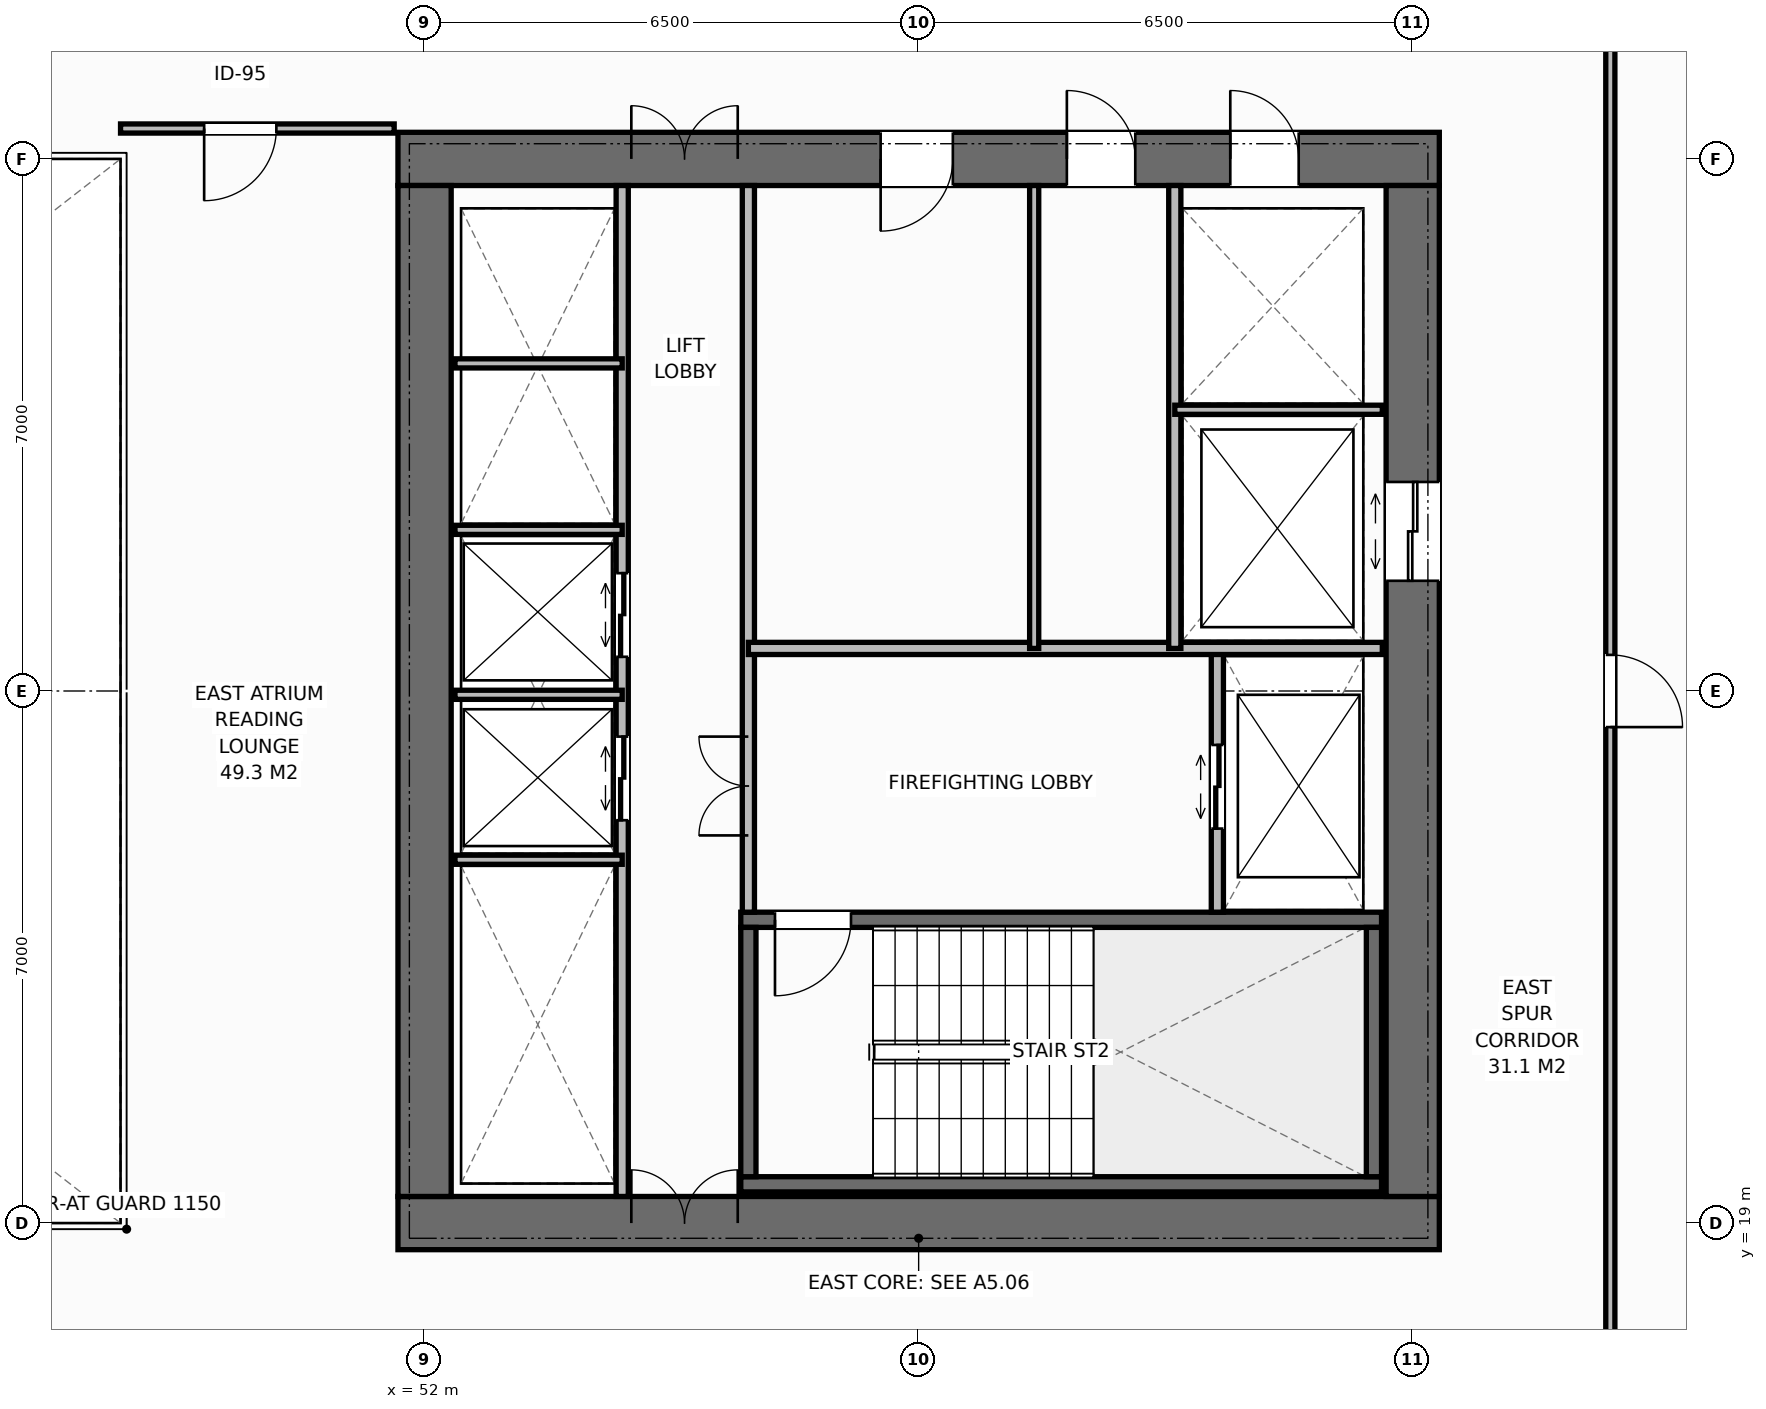
"""IFC4 building model, lengths in metres.
Left out: names, types, materials, properties, quantities, classifications, styles, units other than length and angle.
Written with IfcOpenShell. Run it as: python <this file> out.ifc"""

import sys

from ifc_helpers import new_model, si_unit, direction, frame, frame_2d, origin, place, context, subcontext, project, spatial, rectangle, extrude, element, fill, save


model = new_model("IFC4")
c1 = context("Model", 3, precision=1e-05, world=origin(), true_north=direction((0.0, 1.0)))
c2 = subcontext(c1, "Body", "Model", "MODEL_VIEW")
j1 = project(units=[si_unit("LENGTHUNIT", "METRE"), si_unit("PLANEANGLEUNIT", "RADIAN")], contexts=[c1])
p1 = place(None, origin())
s1 = spatial("IfcSite", under=j1, at=p1, CompositionType="ELEMENT")
p2 = place(p1, origin())
s2 = spatial("IfcBuilding", under=s1, at=p2, CompositionType="ELEMENT")
p3 = place(p2, frame((0.0, 0.0, 89.8)))
s3 = spatial("IfcBuildingStorey", under=s2, at=p3, CompositionType="ELEMENT", Elevation=89.8)
p4 = place(p3, frame((51.65, 19.0, 0.0), z_axis=(0.0, 0.0, 1.0), x_axis=(1.0, 0.0, 0.0)))
e1 = element("IfcWall", 1, at=p4, inside=s3, PredefinedType="SHEAR", context=c2, shape_type="SweptSolid", body=[
    extrude(rectangle(XDim=13.7, YDim=0.7, at=frame_2d((6.85, 0.0))), origin(), (0.0, 0.0, 1.0), 3.8),
])
p5 = place(p4, frame((3.07, 0.0, 0.0)))
e2 = element("IfcOpeningElement", 2, at=p5, cuts=e1, PredefinedType="OPENING", context=c2, shape_type="SweptSolid", body=[
    extrude(rectangle(XDim=1.4, YDim=2.2, at=frame_2d((0.7, 1.1))), frame((0.0, 0.36, 0.0), z_axis=(0.0, -1.0, 0.0), x_axis=(1.0, 0.0, 0.0)), (0.0, 0.0, 1.0), 0.72),
])
p6 = place(p3, frame((51.65, 33.0, 0.0), z_axis=(0.0, 0.0, 1.0), x_axis=(1.0, 0.0, 0.0)))
e3 = element("IfcWall", 3, at=p6, inside=s3, PredefinedType="SHEAR", context=c2, shape_type="SweptSolid", body=[
    extrude(rectangle(XDim=13.7, YDim=0.7, at=frame_2d((6.85, 0.0))), origin(), (0.0, 0.0, 1.0), 3.8),
])
p7 = place(p6, frame((3.07, 0.0, 0.0)))
e4 = element("IfcOpeningElement", 4, at=p7, cuts=e3, PredefinedType="OPENING", context=c2, shape_type="SweptSolid", body=[
    extrude(rectangle(XDim=1.4, YDim=2.2, at=frame_2d((0.7, 1.1))), frame((0.0, 0.36, 0.0), z_axis=(0.0, -1.0, 0.0), x_axis=(1.0, 0.0, 0.0)), (0.0, 0.0, 1.0), 0.72),
])
p8 = place(p6, frame((10.95, 0.0, 0.0)))
e5 = element("IfcOpeningElement", 5, at=p8, cuts=e3, PredefinedType="OPENING", context=c2, shape_type="SweptSolid", body=[
    extrude(rectangle(XDim=0.9, YDim=2.15, at=frame_2d((0.45, 1.075))), frame((0.0, 0.36, 0.0), z_axis=(0.0, -1.0, 0.0), x_axis=(1.0, 0.0, 0.0)), (0.0, 0.0, 1.0), 0.72),
])
p9 = place(p6, frame((6.35, 0.0, 0.0)))
e6 = element("IfcOpeningElement", 6, at=p9, cuts=e3, PredefinedType="OPENING", context=c2, shape_type="SweptSolid", body=[
    extrude(rectangle(XDim=0.95, YDim=2.15, at=frame_2d((0.475, 1.075))), frame((0.0, 0.36, 0.0), z_axis=(0.0, -1.0, 0.0), x_axis=(1.0, 0.0, 0.0)), (0.0, 0.0, 1.0), 0.72),
])
p10 = place(p6, frame((8.8, 0.0, 0.0)))
e7 = element("IfcOpeningElement", 7, at=p10, cuts=e3, PredefinedType="OPENING", context=c2, shape_type="SweptSolid", body=[
    extrude(rectangle(XDim=0.9, YDim=2.15, at=frame_2d((0.45, 1.075))), frame((0.0, 0.36, 0.0), z_axis=(0.0, -1.0, 0.0), x_axis=(1.0, 0.0, 0.0)), (0.0, 0.0, 1.0), 0.72),
])
p11 = place(p3, frame((52.0, 19.35, 0.0), z_axis=(0.0, 0.0, 1.0), x_axis=(0.0, 1.0, 0.0)))
e8 = element("IfcWall", 8, at=p11, inside=s3, PredefinedType="SHEAR", context=c2, shape_type="SweptSolid", body=[
    extrude(rectangle(XDim=13.3, YDim=0.7, at=frame_2d((6.65, 0.0))), origin(), (0.0, 0.0, 1.0), 3.8),
])
p12 = place(p3, frame((65.0, 19.35, 0.0), z_axis=(0.0, 0.0, 1.0), x_axis=(0.0, 1.0, 0.0)))
e9 = element("IfcWall", 9, at=p12, inside=s3, PredefinedType="SHEAR", context=c2, shape_type="SweptSolid", body=[
    extrude(rectangle(XDim=13.3, YDim=0.7, at=frame_2d((6.65, 0.0))), origin(), (0.0, 0.0, 1.0), 3.8),
])
p13 = place(p12, frame((8.1, 0.0, 0.0)))
e10 = element("IfcOpeningElement", 10, at=p13, cuts=e9, PredefinedType="OPENING", context=c2, shape_type="SweptSolid", body=[
    extrude(rectangle(XDim=1.3, YDim=2.2, at=frame_2d((0.65, 1.1))), frame((0.0, 0.36, 0.0), z_axis=(0.0, -1.0, 0.0), x_axis=(1.0, 0.0, 0.0)), (0.0, 0.0, 1.0), 0.72),
])
p14 = place(p3, frame((56.16, 19.51, 0.0), z_axis=(0.0, 0.0, 1.0), x_axis=(1.0, 0.0, 0.0)))
e11 = element("IfcWall", 11, at=p14, inside=s3, PredefinedType="SHEAR", context=c2, shape_type="SweptSolid", body=[
    extrude(rectangle(XDim=8.43, YDim=0.2, at=frame_2d((4.215, 0.0))), origin(), (0.0, 0.0, 1.0), 3.8),
])
p15 = place(p3, frame((56.16, 22.99, 0.0), z_axis=(0.0, 0.0, 1.0), x_axis=(1.0, 0.0, 0.0)))
e12 = element("IfcWall", 12, at=p15, inside=s3, PredefinedType="SHEAR", context=c2, shape_type="SweptSolid", body=[
    extrude(rectangle(XDim=8.43, YDim=0.2, at=frame_2d((4.215, 0.0))), origin(), (0.0, 0.0, 1.0), 3.8),
])
p16 = place(p15, frame((0.45, 0.0, 0.0)))
e13 = element("IfcOpeningElement", 13, at=p16, cuts=e12, PredefinedType="OPENING", context=c2, shape_type="SweptSolid", body=[
    extrude(rectangle(XDim=1.0, YDim=2.15, at=frame_2d((0.5, 1.075))), frame((0.0, 0.11, 0.0), z_axis=(0.0, -1.0, 0.0), x_axis=(1.0, 0.0, 0.0)), (0.0, 0.0, 1.0), 0.22),
])
for number, where, z_axis, x_axis in (
    (14, (56.26, 19.61, 0.0), (0.0, 0.0, 1.0), (0.0, 1.0, 0.0)),
    (15, (64.49, 19.61, 0.0), (0.0, 0.0, 1.0), (0.0, 1.0, 0.0)),
):
    element("IfcWall", number, at=place(p3, frame(where, z_axis=z_axis, x_axis=x_axis)), inside=s3, PredefinedType="SHEAR", context=c2, shape_type="SweptSolid", body=[
        extrude(rectangle(XDim=3.28, YDim=0.2, at=frame_2d((1.64, 0.0))), origin(), (0.0, 0.0, 1.0), 3.8),
    ])
p17 = place(p3, frame((54.6, 19.35, 0.0), z_axis=(0.0, 0.0, 1.0), x_axis=(0.0, 1.0, 0.0)))
e16 = element("IfcWall", 16, at=p17, inside=s3, PredefinedType="STANDARD", context=c2, shape_type="SweptSolid", body=[
    extrude(rectangle(XDim=13.3, YDim=0.16, at=frame_2d((6.65, 0.0))), origin(), (0.0, 0.0, 1.0), 3.565),
])
p18 = place(p17, frame((4.95, 0.0, 0.0)))
e17 = element("IfcOpeningElement", 17, at=p18, cuts=e16, PredefinedType="OPENING", context=c2, shape_type="SweptSolid", body=[
    extrude(rectangle(XDim=1.1, YDim=2.2, at=frame_2d((0.55, 1.1))), frame((0.0, 0.09, 0.0), z_axis=(0.0, -1.0, 0.0), x_axis=(1.0, 0.0, 0.0)), (0.0, 0.0, 1.0), 0.18),
])
p19 = place(p17, frame((7.1, 0.0, 0.0)))
e18 = element("IfcOpeningElement", 18, at=p19, cuts=e16, PredefinedType="OPENING", context=c2, shape_type="SweptSolid", body=[
    extrude(rectangle(XDim=1.1, YDim=2.2, at=frame_2d((0.55, 1.1))), frame((0.0, 0.09, 0.0), z_axis=(0.0, -1.0, 0.0), x_axis=(1.0, 0.0, 0.0)), (0.0, 0.0, 1.0), 0.18),
])
p20 = place(p3, frame((56.26, 23.09, 0.0), z_axis=(0.0, 0.0, 1.0), x_axis=(0.0, 1.0, 0.0)))
e19 = element("IfcWall", 19, at=p20, inside=s3, PredefinedType="STANDARD", context=c2, shape_type="SweptSolid", body=[
    extrude(rectangle(XDim=9.56, YDim=0.16, at=frame_2d((4.78, 0.0))), origin(), (0.0, 0.0, 1.0), 3.565),
])
p21 = place(p20, frame((1.01, 0.0, 0.0)))
e20 = element("IfcOpeningElement", 20, at=p21, cuts=e19, PredefinedType="OPENING", context=c2, shape_type="SweptSolid", body=[
    extrude(rectangle(XDim=1.3, YDim=2.2, at=frame_2d((0.65, 1.1))), frame((0.0, 0.09, 0.0), z_axis=(0.0, -1.0, 0.0), x_axis=(1.0, 0.0, 0.0)), (0.0, 0.0, 1.0), 0.18),
])
for number, where, z_axis, x_axis in (
    (21, (52.4, 23.78, 0.0), (0.0, 0.0, 1.0), (1.0, 0.0, 0.0)),
    (22, (52.4, 25.95, 0.0), (0.0, 0.0, 1.0), (1.0, 0.0, 0.0)),
    (23, (52.4, 28.12, 0.0), (0.0, 0.0, 1.0), (1.0, 0.0, 0.0)),
    (24, (52.4, 30.31, 0.0), (0.0, 0.0, 1.0), (1.0, 0.0, 0.0)),
):
    element("IfcWall", number, at=place(p3, frame(where, z_axis=z_axis, x_axis=x_axis)), inside=s3, PredefinedType="PARTITIONING", context=c2, shape_type="SweptSolid", body=[
        extrude(rectangle(XDim=2.2, YDim=0.12, at=frame_2d((1.1, 0.0))), origin(), (0.0, 0.0, 1.0), 3.565),
    ])
p22 = place(p3, frame((62.43, 23.09, 0.0), z_axis=(0.0, 0.0, 1.0), x_axis=(0.0, 1.0, 0.0)))
e25 = element("IfcWall", 25, at=p22, inside=s3, PredefinedType="STANDARD", context=c2, shape_type="SweptSolid", body=[
    extrude(rectangle(XDim=3.47, YDim=0.16, at=frame_2d((1.735, 0.0))), origin(), (0.0, 0.0, 1.0), 3.565),
])
p23 = place(p22, frame((1.1, 0.0, 0.0)))
e26 = element("IfcOpeningElement", 26, at=p23, cuts=e25, PredefinedType="OPENING", context=c2, shape_type="SweptSolid", body=[
    extrude(rectangle(XDim=1.1, YDim=2.2, at=frame_2d((0.55, 1.1))), frame((0.0, 0.09, 0.0), z_axis=(0.0, -1.0, 0.0), x_axis=(1.0, 0.0, 0.0)), (0.0, 0.0, 1.0), 0.18),
])
p24 = place(p3, frame((56.26, 26.56, 0.0), z_axis=(0.0, 0.0, 1.0), x_axis=(1.0, 0.0, 0.0)))
e27 = element("IfcWall", 27, at=p24, inside=s3, PredefinedType="STANDARD", context=c2, shape_type="SweptSolid", body=[
    extrude(rectangle(XDim=8.34, YDim=0.16, at=frame_2d((4.17, 0.0))), origin(), (0.0, 0.0, 1.0), 3.565),
])
p25 = place(p3, frame((61.87, 26.56, 0.0), z_axis=(0.0, 0.0, 1.0), x_axis=(0.0, 1.0, 0.0)))
e28 = element("IfcWall", 28, at=p25, inside=s3, PredefinedType="STANDARD", context=c2, shape_type="SweptSolid", body=[
    extrude(rectangle(XDim=6.09, YDim=0.16, at=frame_2d((3.045, 0.0))), origin(), (0.0, 0.0, 1.0), 3.565),
])
p26 = place(p3, frame((61.87, 29.7, 0.0), z_axis=(0.0, 0.0, 1.0), x_axis=(1.0, 0.0, 0.0)))
e29 = element("IfcWall", 29, at=p26, inside=s3, PredefinedType="PARTITIONING", context=c2, shape_type="SweptSolid", body=[
    extrude(rectangle(XDim=2.73, YDim=0.12, at=frame_2d((1.365, 0.0))), origin(), (0.0, 0.0, 1.0), 3.565),
])
p27 = place(p3, frame((60.02, 26.56, 0.0), z_axis=(0.0, 0.0, 1.0), x_axis=(0.0, 1.0, 0.0)))
e30 = element("IfcWall", 30, at=p27, inside=s3, PredefinedType="PARTITIONING", context=c2, shape_type="SweptSolid", body=[
    extrude(rectangle(XDim=6.09, YDim=0.12, at=frame_2d((3.045, 0.0))), origin(), (0.0, 0.0, 1.0), 3.565),
])
p28 = place(p3, frame((48.0, 33.4, 0.0), z_axis=(0.0, 0.0, 1.0), x_axis=(1.0, 0.0, 0.0)))
e31 = element("IfcWall", 31, at=p28, inside=s3, PredefinedType="PARTITIONING", context=c2, shape_type="SweptSolid", body=[
    extrude(rectangle(XDim=3.6, YDim=0.12, at=frame_2d((1.8, 0.0))), origin(), (0.0, 0.0, 1.0), 3.565),
])
p29 = place(p28, frame((1.1, 0.0, 0.0)))
e32 = element("IfcOpeningElement", 32, at=p29, cuts=e31, PredefinedType="OPENING", context=c2, shape_type="SweptSolid", body=[
    extrude(rectangle(XDim=0.95, YDim=2.15, at=frame_2d((0.475, 1.075))), frame((0.0, 0.07, 0.0), z_axis=(0.0, -1.0, 0.0), x_axis=(1.0, 0.0, 0.0)), (0.0, 0.0, 1.0), 0.14),
])
p30 = place(p3, frame((67.6, 16.5, 0.0), z_axis=(0.0, 0.0, 1.0), x_axis=(0.0, 1.0, 0.0)))
e33 = element("IfcWall", 33, at=p30, inside=s3, PredefinedType="PARTITIONING", context=c2, shape_type="SweptSolid", body=[
    extrude(rectangle(XDim=19.0, YDim=0.12, at=frame_2d((9.5, 0.0))), origin(), (0.0, 0.0, 1.0), 3.565),
])
p31 = place(p30, frame((9.025, 0.0, 0.0)))
e34 = element("IfcOpeningElement", 34, at=p31, cuts=e33, PredefinedType="OPENING", context=c2, shape_type="SweptSolid", body=[
    extrude(rectangle(XDim=0.95, YDim=2.15, at=frame_2d((0.475, 1.075))), frame((0.0, 0.07, 0.0), z_axis=(0.0, -1.0, 0.0), x_axis=(1.0, 0.0, 0.0)), (0.0, 0.0, 1.0), 0.14),
])
p32 = place(p5, origin())
e35 = element("IfcDoor", 35, at=p32, inside=s3, OperationType="DOUBLE_DOOR_SINGLE_SWING", PredefinedType="DOOR", context=c2, shape_type="SweptSolid", body=[
    extrude(rectangle(XDim=1.4, YDim=2.2, at=frame_2d((0.7, 1.1))), frame((0.0, 0.125, 0.0), z_axis=(0.0, -1.0, 0.0), x_axis=(1.0, 0.0, 0.0)), (0.0, 0.0, 1.0), 0.05),
])
fill(e2, e35)
p33 = place(p7, origin())
e36 = element("IfcDoor", 36, at=p33, inside=s3, OperationType="DOUBLE_DOOR_SINGLE_SWING", PredefinedType="DOOR", context=c2, shape_type="SweptSolid", body=[
    extrude(rectangle(XDim=1.4, YDim=2.2, at=frame_2d((0.7, 1.1))), frame((0.0, -0.075, 0.0), z_axis=(0.0, -1.0, 0.0), x_axis=(1.0, 0.0, 0.0)), (0.0, 0.0, 1.0), 0.05),
])
fill(e4, e36)
p34 = place(p18, origin())
e37 = element("IfcDoor", 37, at=p34, inside=s3, OperationType="DOUBLE_DOOR_SLIDING", PredefinedType="DOOR", context=c2, shape_type="SweptSolid", body=[
    extrude(rectangle(XDim=1.1, YDim=2.2, at=frame_2d((0.55, 1.1))), frame((0.0, 0.025, 0.0), z_axis=(0.0, -1.0, 0.0), x_axis=(1.0, 0.0, 0.0)), (0.0, 0.0, 1.0), 0.05),
])
fill(e17, e37)
p35 = place(p19, origin())
e38 = element("IfcDoor", 38, at=p35, inside=s3, OperationType="DOUBLE_DOOR_SLIDING", PredefinedType="DOOR", context=c2, shape_type="SweptSolid", body=[
    extrude(rectangle(XDim=1.1, YDim=2.2, at=frame_2d((0.55, 1.1))), frame((0.0, 0.025, 0.0), z_axis=(0.0, -1.0, 0.0), x_axis=(1.0, 0.0, 0.0)), (0.0, 0.0, 1.0), 0.05),
])
fill(e18, e38)
p36 = place(p16, origin())
e39 = element("IfcDoor", 39, at=p36, inside=s3, OperationType="SINGLE_SWING_RIGHT", PredefinedType="DOOR", context=c2, shape_type="SweptSolid", body=[
    extrude(rectangle(XDim=1.0, YDim=2.15, at=frame_2d((0.5, 1.075))), frame((0.0, 0.025, 0.0), z_axis=(0.0, -1.0, 0.0), x_axis=(1.0, 0.0, 0.0)), (0.0, 0.0, 1.0), 0.05),
])
fill(e13, e39)
p37 = place(p23, origin())
e40 = element("IfcDoor", 40, at=p37, inside=s3, OperationType="DOUBLE_DOOR_SLIDING", PredefinedType="DOOR", context=c2, shape_type="SweptSolid", body=[
    extrude(rectangle(XDim=1.1, YDim=2.2, at=frame_2d((0.55, 1.1))), frame((0.0, 0.025, 0.0), z_axis=(0.0, -1.0, 0.0), x_axis=(1.0, 0.0, 0.0)), (0.0, 0.0, 1.0), 0.05),
])
fill(e26, e40)
p38 = place(p21, origin())
e41 = element("IfcDoor", 41, at=p38, inside=s3, OperationType="DOUBLE_DOOR_SINGLE_SWING", PredefinedType="DOOR", context=c2, shape_type="SweptSolid", body=[
    extrude(rectangle(XDim=1.3, YDim=2.2, at=frame_2d((0.65, 1.1))), frame((0.0, 0.025, 0.0), z_axis=(0.0, -1.0, 0.0), x_axis=(1.0, 0.0, 0.0)), (0.0, 0.0, 1.0), 0.05),
])
fill(e20, e41)
p39 = place(p13, origin())
e42 = element("IfcDoor", 42, at=p39, inside=s3, OperationType="DOUBLE_DOOR_SLIDING", PredefinedType="DOOR", context=c2, shape_type="SweptSolid", body=[
    extrude(rectangle(XDim=1.3, YDim=2.2, at=frame_2d((0.65, 1.1))), frame((0.0, 0.025, 0.0), z_axis=(0.0, -1.0, 0.0), x_axis=(1.0, 0.0, 0.0)), (0.0, 0.0, 1.0), 0.05),
])
fill(e10, e42)
p40 = place(p8, origin())
e43 = element("IfcDoor", 43, at=p40, inside=s3, OperationType="SINGLE_SWING_LEFT", PredefinedType="DOOR", context=c2, shape_type="SweptSolid", body=[
    extrude(rectangle(XDim=0.9, YDim=2.15, at=frame_2d((0.45, 1.075))), frame((0.0, -0.075, 0.0), z_axis=(0.0, -1.0, 0.0), x_axis=(1.0, 0.0, 0.0)), (0.0, 0.0, 1.0), 0.05),
])
fill(e5, e43)
p41 = place(p9, origin())
e44 = element("IfcDoor", 44, at=p41, inside=s3, OperationType="SINGLE_SWING_RIGHT", PredefinedType="DOOR", context=c2, shape_type="SweptSolid", body=[
    extrude(rectangle(XDim=0.95, YDim=2.15, at=frame_2d((0.475, 1.075))), frame((0.0, -0.075, 0.0), z_axis=(0.0, -1.0, 0.0), x_axis=(1.0, 0.0, 0.0)), (0.0, 0.0, 1.0), 0.05),
])
fill(e6, e44)
p42 = place(p10, origin())
e45 = element("IfcDoor", 45, at=p42, inside=s3, OperationType="SINGLE_SWING_LEFT", PredefinedType="DOOR", context=c2, shape_type="SweptSolid", body=[
    extrude(rectangle(XDim=0.9, YDim=2.15, at=frame_2d((0.45, 1.075))), frame((0.0, -0.075, 0.0), z_axis=(0.0, -1.0, 0.0), x_axis=(1.0, 0.0, 0.0)), (0.0, 0.0, 1.0), 0.05),
])
fill(e7, e45)
p43 = place(p29, origin())
e46 = element("IfcDoor", 46, at=p43, inside=s3, OperationType="SINGLE_SWING_RIGHT", PredefinedType="DOOR", context=c2, shape_type="SweptSolid", body=[
    extrude(rectangle(XDim=0.95, YDim=2.15, at=frame_2d((0.475, 1.075))), frame((0.0, 0.025, 0.0), z_axis=(0.0, -1.0, 0.0), x_axis=(1.0, 0.0, 0.0)), (0.0, 0.0, 1.0), 0.05),
])
fill(e32, e46)
p44 = place(p31, origin())
e47 = element("IfcDoor", 47, at=p44, inside=s3, OperationType="SINGLE_SWING_RIGHT", PredefinedType="DOOR", context=c2, shape_type="SweptSolid", body=[
    extrude(rectangle(XDim=0.95, YDim=2.15, at=frame_2d((0.475, 1.075))), frame((0.0, 0.025, 0.0), z_axis=(0.0, -1.0, 0.0), x_axis=(1.0, 0.0, 0.0)), (0.0, 0.0, 1.0), 0.05),
])
fill(e34, e47)
save(model, sys.argv[1])
